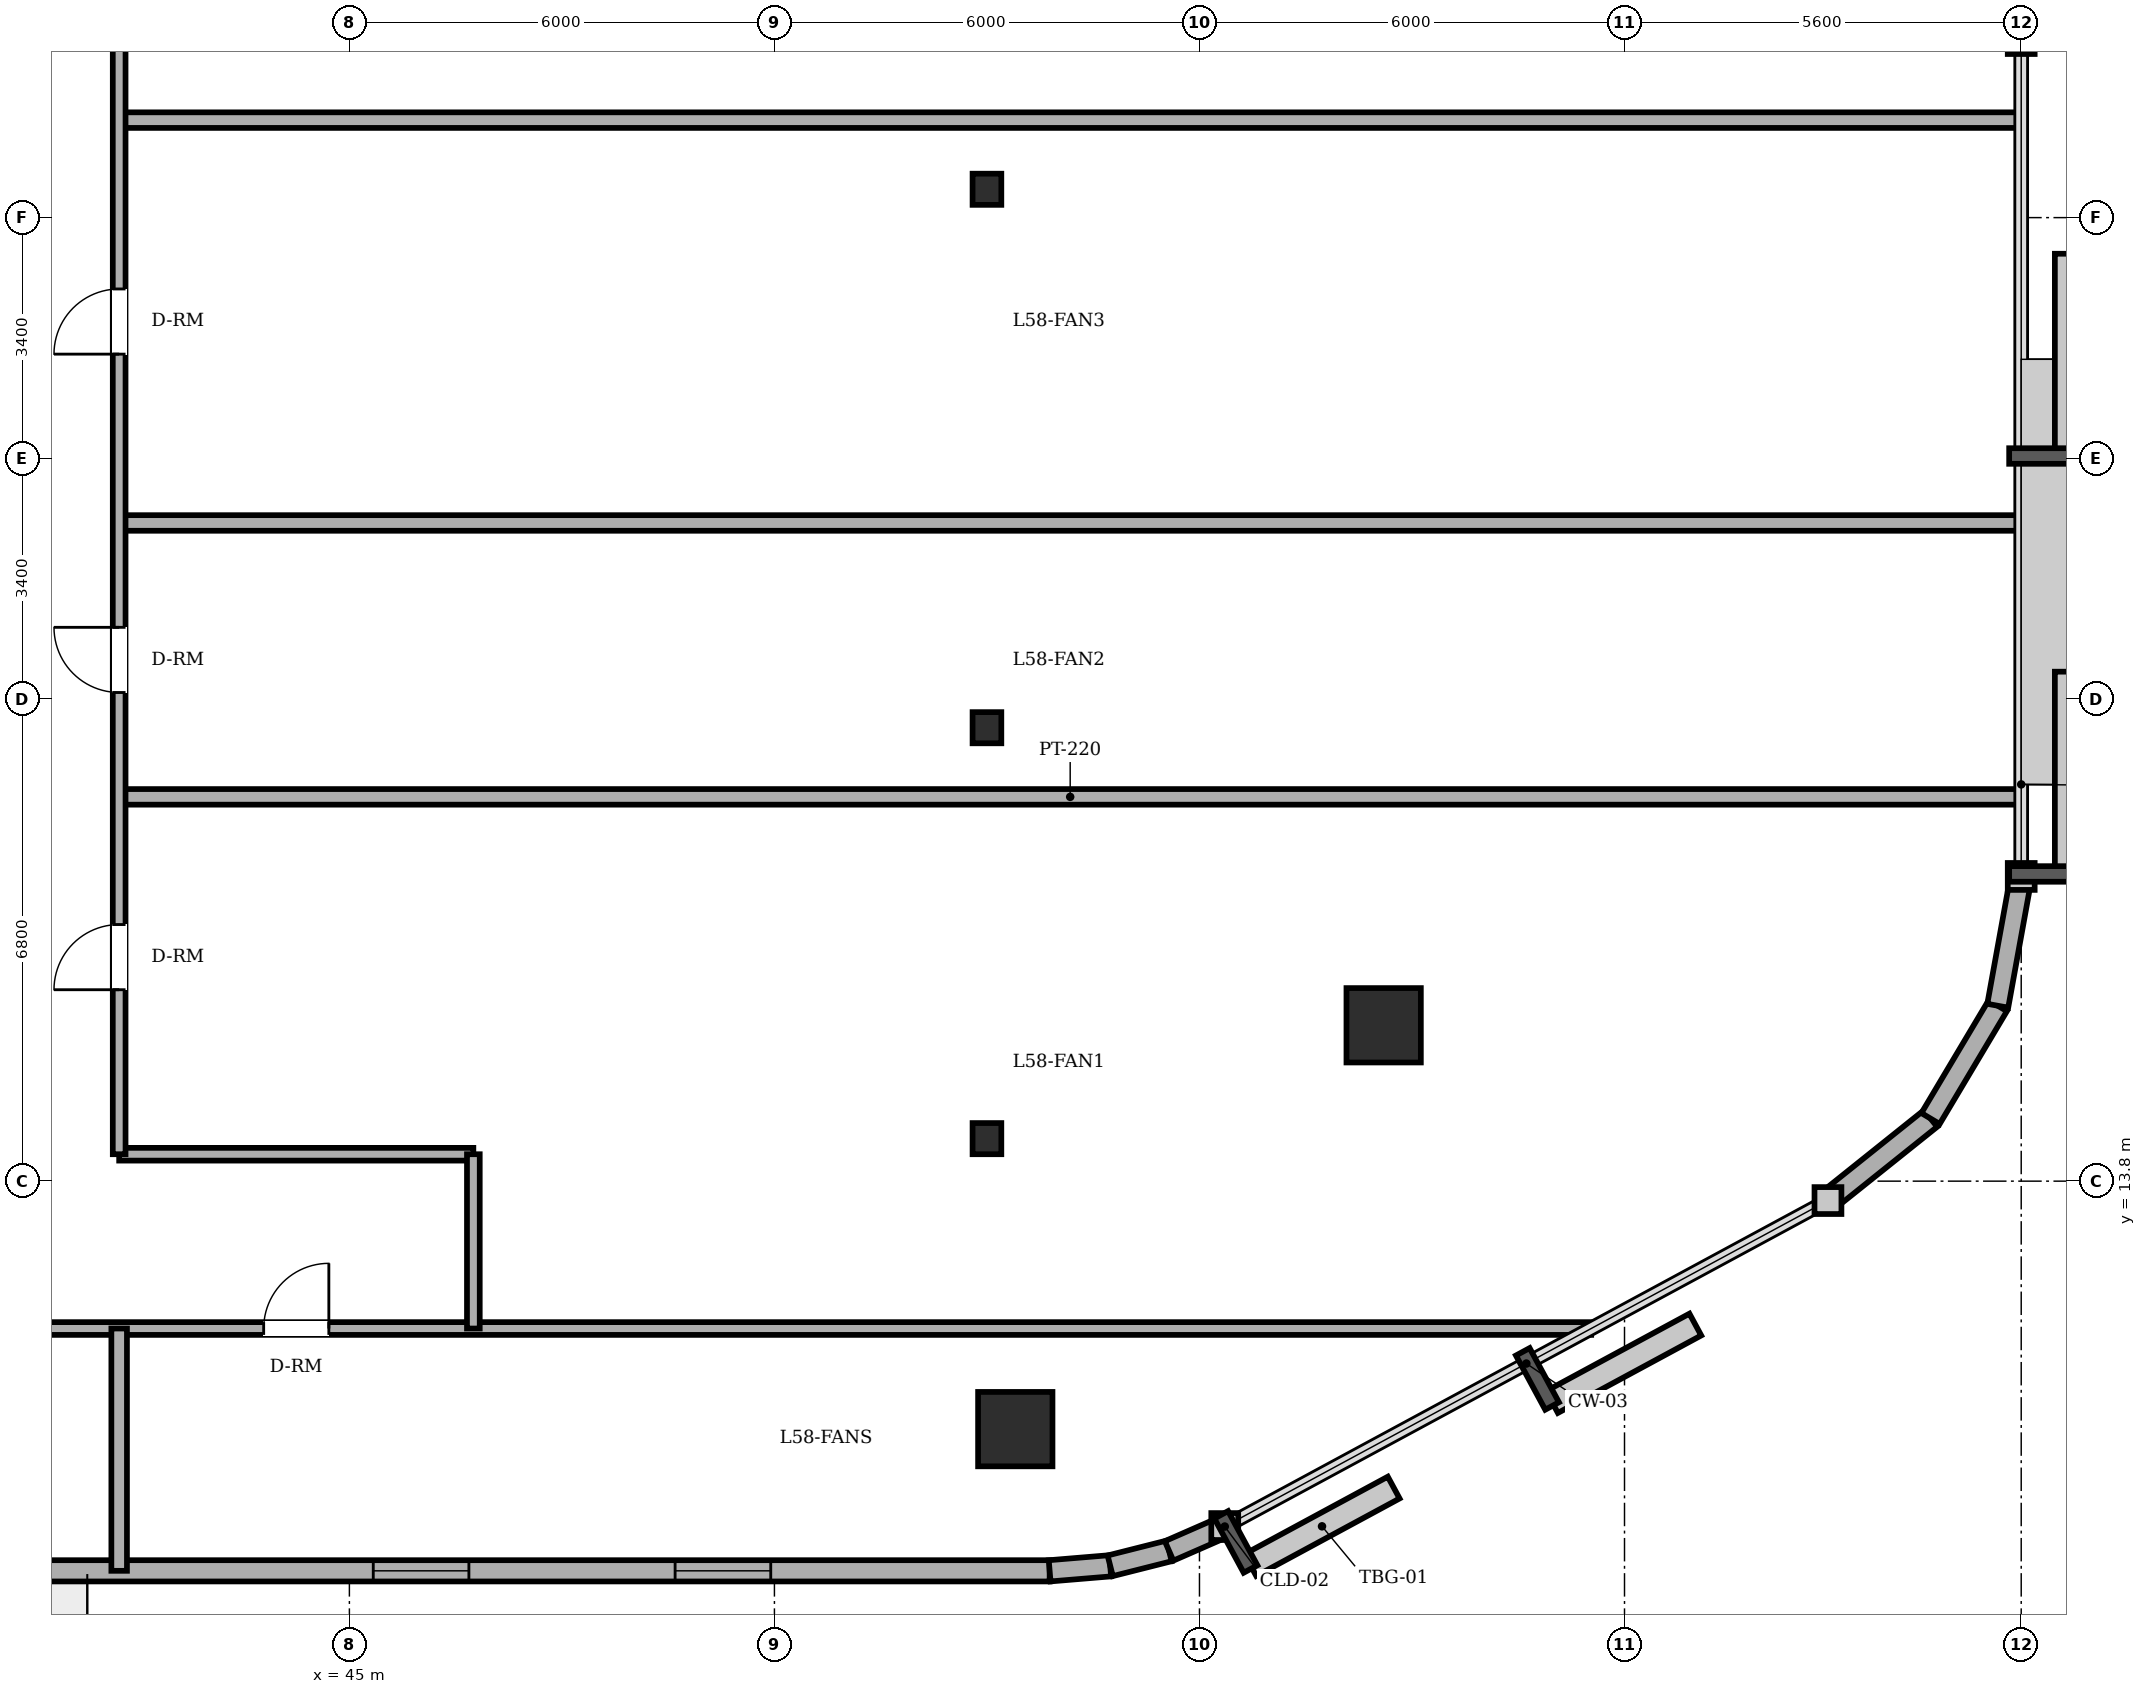
"""IFC4 building model, lengths in metres.
Left out: names, types, materials, properties, quantities, classifications, styles, units other than length and angle.
Written with IfcOpenShell. Run it as: python <this file> out.ifc"""

import sys

from ifc_helpers import new_model, si_unit, direction, frame, frame_2d, origin, origin_2d, place, context, subcontext, project, spatial, rectangle, circle, i_section, extrude, element, fill, save


model = new_model("IFC4")
c1 = context("Model", 3, precision=1e-05, world=origin(), true_north=direction((0.0, 1.0)))
c2 = subcontext(c1, "Body", "Model", "MODEL_VIEW")
j1 = project(units=[si_unit("LENGTHUNIT", "METRE"), si_unit("PLANEANGLEUNIT", "RADIAN")], contexts=[c1])
p1 = place(None, origin())
s1 = spatial("IfcSite", under=j1, at=p1, CompositionType="ELEMENT")
p2 = place(p1, origin())
s2 = spatial("IfcBuilding", under=s1, at=p2, CompositionType="ELEMENT")
p3 = place(p2, frame((0.0, 0.0, 222.9)))
s3 = spatial("IfcBuildingStorey", under=s2, at=p3, CompositionType="ELEMENT", Elevation=222.9)
for number, where, z_axis, x_axis in (
    (1, (54.4, 10.3, 0.0), (0.0, 0.0, 1.0), (1.0, 0.0, 0.0)),
    (2, (59.6, 16.0, 0.0), (0.0, 0.0, 1.0), (1.0, 0.0, 0.0)),
):
    element("IfcColumn", number, at=place(p3, frame(where, z_axis=z_axis, x_axis=x_axis)), inside=s3, PredefinedType="COLUMN", context=c2, shape_type="SweptSolid", body=[
        extrude(circle(Radius=0.525, at=origin_2d()), origin(), (0.0, 0.0, 1.0), 3.6),
    ])
for number, where, z_axis, x_axis in (
    (3, (54.0, 14.4, 0.0), (0.0, 0.0, 1.0), (1.0, 0.0, 0.0)),
    (4, (54.0, 20.2, 0.0), (0.0, 0.0, 1.0), (1.0, 0.0, 0.0)),
    (5, (54.0, 27.8, 0.0), (0.0, 0.0, 1.0), (1.0, 0.0, 0.0)),
):
    element("IfcColumn", number, at=place(p3, frame(where, z_axis=z_axis, x_axis=x_axis)), inside=s3, PredefinedType="COLUMN", context=c2, shape_type="SweptSolid", body=[
        extrude(i_section(OverallWidth=0.406, OverallDepth=0.44, WebThickness=0.024, FlangeThickness=0.039, FilletRadius=0.015, at=origin_2d()), origin(), (0.0, 0.0, 1.0), 3.6),
    ])
p4 = place(p3, frame((22.4, 8.3, 0.0), z_axis=(0.0, 0.0, 1.0), x_axis=(1.0, 0.0, 0.0)))
e6 = element("IfcWall", 6, at=p4, inside=s3, PredefinedType="SOLIDWALL", context=c2, shape_type="SweptSolid", body=[
    extrude(rectangle(XDim=32.485, YDim=0.3, at=frame_2d((16.243, 0.0))), origin(), (0.0, 0.0, 1.0), 3.4),
])
p5 = place(p4, frame((13.925, 0.0, 0.0)))
e7 = element("IfcOpeningElement", 7, at=p5, cuts=e6, PredefinedType="OPENING", context=c2, shape_type="SweptSolid", body=[
    extrude(rectangle(XDim=0.95, YDim=2.2, at=frame_2d((0.475, 1.1))), frame((0.0, 0.16, 0.0), z_axis=(0.0, -1.0, 0.0), x_axis=(1.0, 0.0, 0.0)), (0.0, 0.0, 1.0), 0.32),
])
p6 = place(p4, frame((1.3, 0.0, 0.85)))
e8 = element("IfcOpeningElement", 8, at=p6, cuts=e6, PredefinedType="OPENING", context=c2, shape_type="SweptSolid", body=[
    extrude(rectangle(XDim=1.35, YDim=1.55, at=frame_2d((0.675, 0.775))), frame((0.0, 0.16, 0.0), z_axis=(0.0, -1.0, 0.0), x_axis=(1.0, 0.0, 0.0)), (0.0, 0.0, 1.0), 0.32),
])
p7 = place(p4, frame((4.825, 0.0, 0.85)))
e9 = element("IfcOpeningElement", 9, at=p7, cuts=e6, PredefinedType="OPENING", context=c2, shape_type="SweptSolid", body=[
    extrude(rectangle(XDim=1.35, YDim=1.55, at=frame_2d((0.675, 0.775))), frame((0.0, 0.16, 0.0), z_axis=(0.0, -1.0, 0.0), x_axis=(1.0, 0.0, 0.0)), (0.0, 0.0, 1.0), 0.32),
])
p8 = place(p4, frame((10.708, 0.0, 0.85)))
e10 = element("IfcOpeningElement", 10, at=p8, cuts=e6, PredefinedType="OPENING", context=c2, shape_type="SweptSolid", body=[
    extrude(rectangle(XDim=1.35, YDim=1.55, at=frame_2d((0.675, 0.775))), frame((0.0, 0.16, 0.0), z_axis=(0.0, -1.0, 0.0), x_axis=(1.0, 0.0, 0.0)), (0.0, 0.0, 1.0), 0.32),
])
p9 = place(p4, frame((22.937, 0.0, 0.85)))
e11 = element("IfcOpeningElement", 11, at=p9, cuts=e6, PredefinedType="OPENING", context=c2, shape_type="SweptSolid", body=[
    extrude(rectangle(XDim=1.35, YDim=1.55, at=frame_2d((0.675, 0.775))), frame((0.0, 0.16, 0.0), z_axis=(0.0, -1.0, 0.0), x_axis=(1.0, 0.0, 0.0)), (0.0, 0.0, 1.0), 0.32),
])
p10 = place(p4, frame((27.198, 0.0, 0.85)))
e12 = element("IfcOpeningElement", 12, at=p10, cuts=e6, PredefinedType="OPENING", context=c2, shape_type="SweptSolid", body=[
    extrude(rectangle(XDim=1.35, YDim=1.55, at=frame_2d((0.675, 0.775))), frame((0.0, 0.16, 0.0), z_axis=(0.0, -1.0, 0.0), x_axis=(1.0, 0.0, 0.0)), (0.0, 0.0, 1.0), 0.32),
])
p11 = place(p3, frame((54.885, 8.3, 0.0), z_axis=(0.0, 0.0, 1.0), x_axis=(0.996565355958, 0.082809971041, 0.0)))
e13 = element("IfcWall", 13, at=p11, inside=s3, PredefinedType="SOLIDWALL", context=c2, shape_type="SweptSolid", body=[
    extrude(rectangle(XDim=0.858, YDim=0.3, at=frame_2d((0.429, 0.0))), origin(), (0.0, 0.0, 1.0), 3.4),
])
p12 = place(p3, frame((55.74, 8.371, 0.0), z_axis=(0.0, 0.0, 1.0), x_axis=(0.969536346338, 0.244947490555, 0.0)))
e14 = element("IfcWall", 14, at=p12, inside=s3, PredefinedType="SOLIDWALL", context=c2, shape_type="SweptSolid", body=[
    extrude(rectangle(XDim=0.857, YDim=0.3, at=frame_2d((0.429, 0.0))), origin(), (0.0, 0.0, 1.0), 3.4),
])
p13 = place(p3, frame((56.571, 8.581, 0.0), z_axis=(0.0, 0.0, 1.0), x_axis=(0.916085473636, 0.400983048261, 0.0)))
e15 = element("IfcWall", 15, at=p13, inside=s3, PredefinedType="SOLIDWALL", context=c2, shape_type="SweptSolid", body=[
    extrude(rectangle(XDim=0.858, YDim=0.3, at=frame_2d((0.429, 0.0))), origin(), (0.0, 0.0, 1.0), 3.4),
])
p14 = place(p3, frame((65.872, 13.526, 0.0), z_axis=(0.0, 0.0, 1.0), x_axis=(0.780920189257, 0.624630817372, 0.0)))
e16 = element("IfcWall", 16, at=p14, inside=s3, PredefinedType="SOLIDWALL", context=c2, shape_type="SweptSolid", body=[
    extrude(rectangle(XDim=1.854, YDim=0.3, at=frame_2d((0.927, 0.0))), origin(), (0.0, 0.0, 1.0), 3.4),
])
p15 = place(p3, frame((67.32, 14.684, 0.0), z_axis=(0.0, 0.0, 1.0), x_axis=(0.512072018927, 0.858942516955, 0.0)))
e17 = element("IfcWall", 17, at=p15, inside=s3, PredefinedType="SOLIDWALL", context=c2, shape_type="SweptSolid", body=[
    extrude(rectangle(XDim=1.853, YDim=0.3, at=frame_2d((0.927, 0.0))), origin(), (0.0, 0.0, 1.0), 3.4),
])
p16 = place(p3, frame((68.269, 16.276, 0.0), z_axis=(0.0, 0.0, 1.0), x_axis=(0.178468469252, 0.983945631365, 0.0)))
e18 = element("IfcWall", 18, at=p16, inside=s3, PredefinedType="SOLIDWALL", context=c2, shape_type="SweptSolid", body=[
    extrude(rectangle(XDim=1.855, YDim=0.3, at=frame_2d((0.927, 0.0))), origin(), (0.0, 0.0, 1.0), 3.4),
])
p17 = place(p3, frame((17.677, 11.72, 0.0), z_axis=(0.0, 0.0, 1.0), x_axis=(1.0, 0.0, 0.0)))
e19 = element("IfcWall", 19, at=p17, inside=s3, PredefinedType="PARTITIONING", context=c2, shape_type="SweptSolid", body=[
    extrude(rectangle(XDim=44.853, YDim=0.18, at=frame_2d((22.427, 0.0))), origin(), (0.0, 0.0, 1.0), 3.4),
])
p18 = place(p17, frame((9.763, 0.0, 0.0)))
e20 = element("IfcOpeningElement", 20, at=p18, cuts=e19, PredefinedType="OPENING", context=c2, shape_type="SweptSolid", body=[
    extrude(rectangle(XDim=0.92, YDim=2.1, at=frame_2d((0.46, 1.05))), frame((0.0, 0.1, 0.0), z_axis=(0.0, -1.0, 0.0), x_axis=(1.0, 0.0, 0.0)), (0.0, 0.0, 1.0), 0.2),
])
p19 = place(p17, frame((26.113, 0.0, 0.0)))
e21 = element("IfcOpeningElement", 21, at=p19, cuts=e19, PredefinedType="OPENING", context=c2, shape_type="SweptSolid", body=[
    extrude(rectangle(XDim=0.92, YDim=2.1, at=frame_2d((0.46, 1.05))), frame((0.0, 0.1, 0.0), z_axis=(0.0, -1.0, 0.0), x_axis=(1.0, 0.0, 0.0)), (0.0, 0.0, 1.0), 0.2),
])
p20 = place(p17, frame((4.063, 0.0, 0.0)))
e22 = element("IfcOpeningElement", 22, at=p20, cuts=e19, PredefinedType="OPENING", context=c2, shape_type="SweptSolid", body=[
    extrude(rectangle(XDim=0.92, YDim=2.1, at=frame_2d((0.46, 1.05))), frame((0.0, 0.1, 0.0), z_axis=(0.0, -1.0, 0.0), x_axis=(1.0, 0.0, 0.0)), (0.0, 0.0, 1.0), 0.2),
])
p21 = place(p17, frame((17.638, 0.0, 0.0)))
e23 = element("IfcOpeningElement", 23, at=p21, cuts=e19, PredefinedType="OPENING", context=c2, shape_type="SweptSolid", body=[
    extrude(rectangle(XDim=0.92, YDim=2.1, at=frame_2d((0.46, 1.05))), frame((0.0, 0.1, 0.0), z_axis=(0.0, -1.0, 0.0), x_axis=(1.0, 0.0, 0.0)), (0.0, 0.0, 1.0), 0.2),
])
p22 = place(p3, frame((41.75, 14.18, 0.0), z_axis=(0.0, 0.0, 1.0), x_axis=(1.0, 0.0, 0.0)))
e24 = element("IfcWall", 24, at=p22, inside=s3, PredefinedType="PARTITIONING", context=c2, shape_type="SweptSolid", body=[
    extrude(rectangle(XDim=5.0, YDim=0.18, at=frame_2d((2.5, 0.0))), origin(), (0.0, 0.0, 1.0), 2.982),
])
for number, where, z_axis, x_axis in (
    (25, (41.75, 19.224, 0.0), (0.0, 0.0, 1.0), (1.0, 0.0, 0.0)),
    (26, (41.75, 23.09, 0.0), (0.0, 0.0, 1.0), (1.0, 0.0, 0.0)),
    (27, (41.75, 28.776, 0.0), (0.0, 0.0, 1.0), (1.0, 0.0, 0.0)),
):
    element("IfcWall", number, at=place(p3, frame(where, z_axis=z_axis, x_axis=x_axis)), inside=s3, PredefinedType="PARTITIONING", context=c2, shape_type="SweptSolid", body=[
        extrude(rectangle(XDim=26.85, YDim=0.22, at=frame_2d((13.425, 0.0))), origin(), (0.0, 0.0, 1.0), 3.4),
    ])
p23 = place(p3, frame((41.75, 8.3, 0.0), z_axis=(0.0, 0.0, 1.0), x_axis=(0.0, 1.0, 0.0)))
e28 = element("IfcWall", 28, at=p23, inside=s3, PredefinedType="PARTITIONING", context=c2, shape_type="SweptSolid", body=[
    extrude(rectangle(XDim=3.42, YDim=0.22, at=frame_2d((1.71, 0.0))), origin(), (0.0, 0.0, 1.0), 3.4),
])
p24 = place(p3, frame((41.75, 14.18, 0.0), z_axis=(0.0, 0.0, 1.0), x_axis=(0.0, 1.0, 0.0)))
e29 = element("IfcWall", 29, at=p24, inside=s3, PredefinedType="PARTITIONING", context=c2, shape_type="SweptSolid", body=[
    extrude(rectangle(XDim=19.64, YDim=0.18, at=frame_2d((9.82, 0.0))), origin(), (0.0, 0.0, 1.0), 3.4),
])
p25 = place(p24, frame((2.322, 0.0, 0.0)))
e30 = element("IfcOpeningElement", 30, at=p25, cuts=e29, PredefinedType="OPENING", context=c2, shape_type="SweptSolid", body=[
    extrude(rectangle(XDim=0.92, YDim=2.1, at=frame_2d((0.46, 1.05))), frame((0.0, 0.1, 0.0), z_axis=(0.0, -1.0, 0.0), x_axis=(1.0, 0.0, 0.0)), (0.0, 0.0, 1.0), 0.2),
])
p26 = place(p24, frame((6.517, 0.0, 0.0)))
e31 = element("IfcOpeningElement", 31, at=p26, cuts=e29, PredefinedType="OPENING", context=c2, shape_type="SweptSolid", body=[
    extrude(rectangle(XDim=0.92, YDim=2.1, at=frame_2d((0.46, 1.05))), frame((0.0, 0.1, 0.0), z_axis=(0.0, -1.0, 0.0), x_axis=(1.0, 0.0, 0.0)), (0.0, 0.0, 1.0), 0.2),
])
p27 = place(p24, frame((11.293, 0.0, 0.0)))
e32 = element("IfcOpeningElement", 32, at=p27, cuts=e29, PredefinedType="OPENING", context=c2, shape_type="SweptSolid", body=[
    extrude(rectangle(XDim=0.92, YDim=2.1, at=frame_2d((0.46, 1.05))), frame((0.0, 0.1, 0.0), z_axis=(0.0, -1.0, 0.0), x_axis=(1.0, 0.0, 0.0)), (0.0, 0.0, 1.0), 0.2),
])
p28 = place(p24, frame((16.358, 0.0, 0.0)))
e33 = element("IfcOpeningElement", 33, at=p28, cuts=e29, PredefinedType="OPENING", context=c2, shape_type="SweptSolid", body=[
    extrude(rectangle(XDim=1.0, YDim=2.15, at=frame_2d((0.5, 1.075))), frame((0.0, 0.1, 0.0), z_axis=(0.0, -1.0, 0.0), x_axis=(1.0, 0.0, 0.0)), (0.0, 0.0, 1.0), 0.2),
])
p29 = place(p3, frame((46.75, 11.72, 0.0), z_axis=(0.0, 0.0, 1.0), x_axis=(0.0, 1.0, 0.0)))
e34 = element("IfcWall", 34, at=p29, inside=s3, PredefinedType="PARTITIONING", context=c2, shape_type="SweptSolid", body=[
    extrude(rectangle(XDim=2.46, YDim=0.18, at=frame_2d((1.23, 0.0))), origin(), (0.0, 0.0, 1.0), 3.4),
])
p30 = place(p9, origin())
e35 = element("IfcWindow", 35, at=p30, inside=s3, PartitioningType="SINGLE_PANEL", PredefinedType="WINDOW", context=c2, shape_type="SweptSolid", body=[
    extrude(rectangle(XDim=1.35, YDim=1.55, at=frame_2d((0.675, 0.775))), frame((0.0, 0.03, 0.0), z_axis=(0.0, -1.0, 0.0), x_axis=(1.0, 0.0, 0.0)), (0.0, 0.0, 1.0), 0.06),
])
fill(e11, e35)
p31 = place(p10, origin())
e36 = element("IfcWindow", 36, at=p31, inside=s3, PartitioningType="SINGLE_PANEL", PredefinedType="WINDOW", context=c2, shape_type="SweptSolid", body=[
    extrude(rectangle(XDim=1.35, YDim=1.55, at=frame_2d((0.675, 0.775))), frame((0.0, 0.03, 0.0), z_axis=(0.0, -1.0, 0.0), x_axis=(1.0, 0.0, 0.0)), (0.0, 0.0, 1.0), 0.06),
])
fill(e12, e36)
p32 = place(p25, origin())
e37 = element("IfcDoor", 37, at=p32, inside=s3, OperationType="SINGLE_SWING_LEFT", PredefinedType="DOOR", context=c2, shape_type="SweptSolid", body=[
    extrude(rectangle(XDim=0.92, YDim=2.1, at=frame_2d((0.46, 1.05))), frame((0.0, 0.025, 0.0), z_axis=(0.0, -1.0, 0.0), x_axis=(1.0, 0.0, 0.0)), (0.0, 0.0, 1.0), 0.05),
])
fill(e30, e37)
p33 = place(p26, origin())
e38 = element("IfcDoor", 38, at=p33, inside=s3, OperationType="SINGLE_SWING_RIGHT", PredefinedType="DOOR", context=c2, shape_type="SweptSolid", body=[
    extrude(rectangle(XDim=0.92, YDim=2.1, at=frame_2d((0.46, 1.05))), frame((0.0, 0.025, 0.0), z_axis=(0.0, -1.0, 0.0), x_axis=(1.0, 0.0, 0.0)), (0.0, 0.0, 1.0), 0.05),
])
fill(e31, e38)
p34 = place(p27, origin())
e39 = element("IfcDoor", 39, at=p34, inside=s3, OperationType="SINGLE_SWING_LEFT", PredefinedType="DOOR", context=c2, shape_type="SweptSolid", body=[
    extrude(rectangle(XDim=0.92, YDim=2.1, at=frame_2d((0.46, 1.05))), frame((0.0, 0.025, 0.0), z_axis=(0.0, -1.0, 0.0), x_axis=(1.0, 0.0, 0.0)), (0.0, 0.0, 1.0), 0.05),
])
fill(e32, e39)
p35 = place(p19, origin())
e40 = element("IfcDoor", 40, at=p35, inside=s3, OperationType="SINGLE_SWING_RIGHT", PredefinedType="DOOR", context=c2, shape_type="SweptSolid", body=[
    extrude(rectangle(XDim=0.92, YDim=2.1, at=frame_2d((0.46, 1.05))), frame((0.0, 0.025, 0.0), z_axis=(0.0, -1.0, 0.0), x_axis=(1.0, 0.0, 0.0)), (0.0, 0.0, 1.0), 0.05),
])
fill(e21, e40)
save(model, sys.argv[1])
